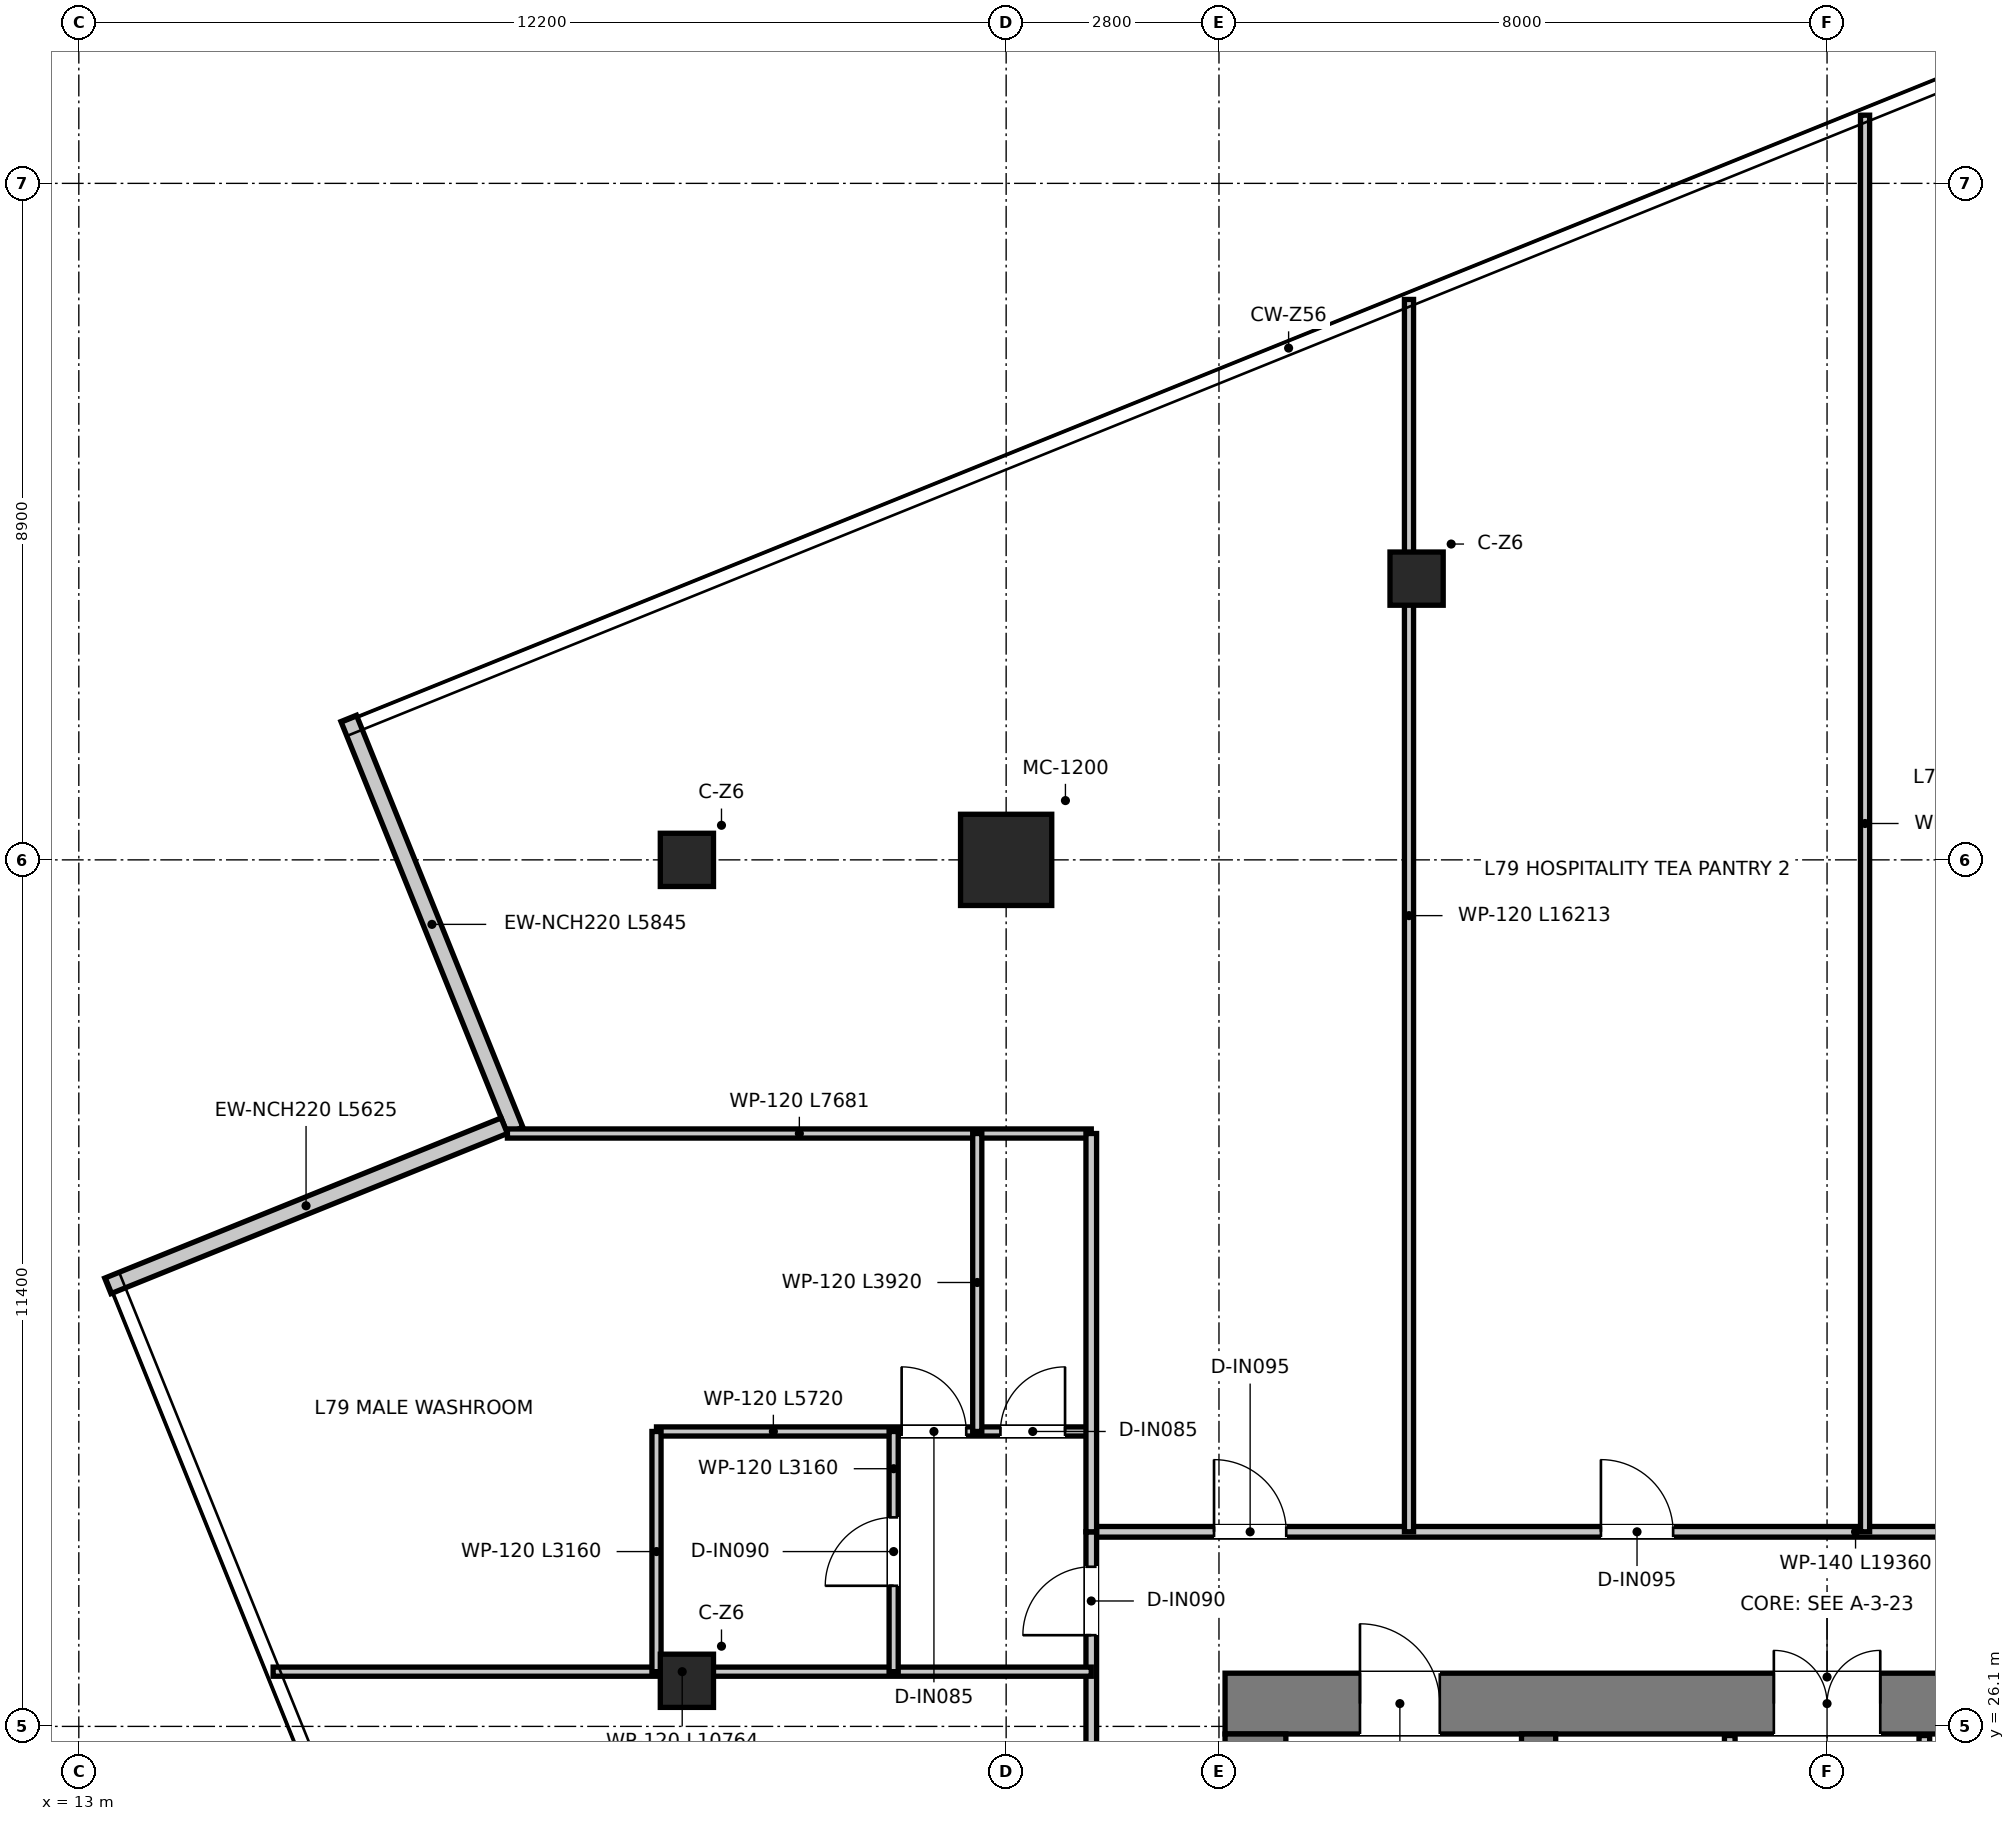
"""IFC4 building model, lengths in metres.
Left out: names, types, materials, properties, quantities, classifications, styles, units other than length and angle.
Written with IfcOpenShell. Run it as: python <this file> out.ifc"""

import sys

from ifc_helpers import new_model, si_unit, direction, frame, frame_2d, origin, origin_2d, place, context, subcontext, project, spatial, rectangle, extrude, source, transform, mapped, element, fill, save


model = new_model("IFC4")
c1 = context("Model", 3, precision=1e-05, world=origin(), true_north=direction((0.0, 1.0)))
c2 = subcontext(c1, "Body", "Model", "MODEL_VIEW")
j1 = project(units=[si_unit("LENGTHUNIT", "METRE"), si_unit("PLANEANGLEUNIT", "RADIAN")], contexts=[c1])
p1 = place(None, origin())
s1 = spatial("IfcSite", under=j1, at=p1, CompositionType="ELEMENT")
p2 = place(p1, origin())
s2 = spatial("IfcBuilding", under=s1, at=p2, CompositionType="ELEMENT")
p3 = place(p2, frame((0.0, 0.0, 323.75)))
s3 = spatial("IfcBuildingStorey", under=s2, at=p3, CompositionType="ELEMENT", Elevation=323.75)
p4 = place(p3, frame((28.08, 26.4, 0.0), z_axis=(0.0, 0.0, 1.0), x_axis=(1.0, 0.0, 0.0)))
e1 = element("IfcWall", 1, at=p4, inside=s3, PredefinedType="SHEAR", context=c2, shape_type="SweptSolid", body=[
    extrude(rectangle(XDim=15.84, YDim=0.8, at=frame_2d((7.92, 0.0))), origin(), (0.0, 0.0, 1.0), 3.95),
])
p5 = place(p4, frame((7.22, 0.0, 0.0)))
e2 = element("IfcOpeningElement", 2, at=p5, cuts=e1, PredefinedType="OPENING", context=c2, shape_type="SweptSolid", body=[
    extrude(rectangle(XDim=1.4, YDim=2.2, at=frame_2d((0.7, 1.1))), frame((0.0, 0.41, 0.0), z_axis=(0.0, -1.0, 0.0), x_axis=(1.0, 0.0, 0.0)), (0.0, 0.0, 1.0), 0.82),
])
p6 = place(p4, frame((1.775, 0.0, 0.0)))
e3 = element("IfcOpeningElement", 3, at=p6, cuts=e1, PredefinedType="OPENING", context=c2, shape_type="SweptSolid", body=[
    extrude(rectangle(XDim=1.05, YDim=2.1, at=frame_2d((0.525, 1.05))), frame((0.0, 0.41, 0.0), z_axis=(0.0, -1.0, 0.0), x_axis=(1.0, 0.0, 0.0)), (0.0, 0.0, 1.0), 0.82),
])
p7 = place(p4, frame((13.015, 0.0, 0.0)))
e4 = element("IfcOpeningElement", 4, at=p7, cuts=e1, PredefinedType="OPENING", context=c2, shape_type="SweptSolid", body=[
    extrude(rectangle(XDim=1.05, YDim=2.1, at=frame_2d((0.525, 1.05))), frame((0.0, 0.41, 0.0), z_axis=(0.0, -1.0, 0.0), x_axis=(1.0, 0.0, 0.0)), (0.0, 0.0, 1.0), 0.82),
])
p8 = place(p3, frame((28.48, 11.3, 0.0), z_axis=(0.0, 0.0, 1.0), x_axis=(0.0, 1.0, 0.0)))
e5 = element("IfcWall", 5, at=p8, inside=s3, PredefinedType="SHEAR", context=c2, shape_type="SweptSolid", body=[
    extrude(rectangle(XDim=14.7, YDim=0.8, at=frame_2d((7.35, 0.0))), origin(), (0.0, 0.0, 1.0), 3.95),
])
p9 = place(p3, frame((32.205, 13.22, 0.0), z_axis=(0.0, 0.0, 1.0), x_axis=(0.0, 1.0, 0.0)))
e6 = element("IfcWall", 6, at=p9, inside=s3, PredefinedType="SHEAR", context=c2, shape_type="SweptSolid", body=[
    extrude(rectangle(XDim=12.78, YDim=0.45, at=frame_2d((6.39, 0.0))), origin(), (0.0, 0.0, 1.0), 3.95),
])
p10 = place(p9, frame((10.58, 0.0, 0.0)))
e7 = element("IfcOpeningElement", 7, at=p10, cuts=e6, PredefinedType="OPENING", context=c2, shape_type="SweptSolid", body=[
    extrude(rectangle(XDim=1.1, YDim=2.15, at=frame_2d((0.55, 1.075))), frame((0.0, 0.235, 0.0), z_axis=(0.0, -1.0, 0.0), x_axis=(1.0, 0.0, 0.0)), (0.0, 0.0, 1.0), 0.47),
])
m1 = source(origin(), c2, "Body", "SweptSolid", [
    extrude(rectangle(XDim=1.2, YDim=1.2, at=origin_2d()), origin(), (0.0, 0.0, 1.0), 3.95),
])
p11 = place(p3, frame((25.2, 37.5, 0.0), z_axis=(0.0, 0.0, 1.0), x_axis=(1.0, 0.0, 0.0)))
e8 = element("IfcColumn", 8, at=p11, inside=s3, PredefinedType="USERDEFINED", context=c2, shape_type="MappedRepresentation", body=[
    mapped(m1, transform((0.0, 0.0, 0.0), x_axis=(1.0, 0.0, 0.0), y_axis=(0.0, 1.0, 0.0), z_axis=(0.0, 0.0, 1.0), scale=1.0)),
])
m2 = source(origin(), c2, "Body", "SweptSolid", [
    extrude(rectangle(XDim=0.7, YDim=0.7, at=origin_2d()), origin(), (0.0, 0.0, 1.0), 3.95),
])
for number, where, z_axis, x_axis in (
    (9, (21.0, 26.7, 0.0), (0.0, 0.0, 1.0), (1.0, 0.0, 0.0)),
    (10, (21.0, 37.5, 0.0), (0.0, 0.0, 1.0), (1.0, 0.0, 0.0)),
    (11, (30.6, 41.2, 0.0), (0.0, 0.0, 1.0), (1.0, 0.0, 0.0)),
):
    element("IfcColumn", number, at=place(p3, frame(where, z_axis=z_axis, x_axis=x_axis)), inside=s3, PredefinedType="COLUMN", context=c2, shape_type="MappedRepresentation", body=[
        mapped(m2, transform((0.0, 0.0, 0.0), x_axis=(1.0, 0.0, 0.0), y_axis=(0.0, 1.0, 0.0), z_axis=(0.0, 0.0, 1.0), scale=1.0)),
    ])
p12 = place(p3, frame((16.551, 39.361, 0.0), z_axis=(0.0, 0.0, 1.0), x_axis=(0.374621884023, -0.927177676614, 0.0)))
e12 = element("IfcWall", 12, at=p12, inside=s3, PredefinedType="ELEMENTEDWALL", context=c2, shape_type="SweptSolid", body=[
    extrude(rectangle(XDim=5.845, YDim=0.22, at=frame_2d((2.922, 0.0))), origin(), (0.0, 0.0, 1.0), 3.67),
])
p13 = place(p3, frame((18.597, 34.002, 0.0), z_axis=(0.0, 0.0, 1.0), x_axis=(-0.927180963658, -0.374613748588, 0.0)))
e13 = element("IfcWall", 13, at=p13, inside=s3, PredefinedType="ELEMENTEDWALL", context=c2, shape_type="SweptSolid", body=[
    extrude(rectangle(XDim=5.625, YDim=0.22, at=frame_2d((2.812, 0.0))), origin(), (0.0, 0.0, 1.0), 3.67),
])
p14 = place(p3, frame((34.72, 20.2, 0.0), z_axis=(0.0, 0.0, 1.0), x_axis=(0.0, 1.0, 0.0)))
e14 = element("IfcWall", 14, at=p14, inside=s3, PredefinedType="PARTITIONING", context=c2, shape_type="SweptSolid", body=[
    extrude(rectangle(XDim=5.78, YDim=0.14, at=frame_2d((2.89, 0.0))), origin(), (0.0, 0.0, 1.0), 2.82),
])
p15 = place(p14, frame((1.05, 0.0, 0.0)))
e15 = element("IfcOpeningElement", 15, at=p15, cuts=e14, PredefinedType="OPENING", context=c2, shape_type="SweptSolid", body=[
    extrude(rectangle(XDim=0.9, YDim=2.1, at=frame_2d((0.45, 1.05))), frame((0.0, 0.08, 0.0), z_axis=(0.0, -1.0, 0.0), x_axis=(1.0, 0.0, 0.0)), (0.0, 0.0, 1.0), 0.16),
])
p16 = place(p3, frame((37.28, 20.2, 0.0), z_axis=(0.0, 0.0, 1.0), x_axis=(0.0, 1.0, 0.0)))
e16 = element("IfcWall", 16, at=p16, inside=s3, PredefinedType="PARTITIONING", context=c2, shape_type="SweptSolid", body=[
    extrude(rectangle(XDim=5.78, YDim=0.14, at=frame_2d((2.89, 0.0))), origin(), (0.0, 0.0, 1.0), 2.82),
])
p17 = place(p16, frame((0.95, 0.0, 0.0)))
e17 = element("IfcOpeningElement", 17, at=p17, cuts=e16, PredefinedType="OPENING", context=c2, shape_type="SweptSolid", body=[
    extrude(rectangle(XDim=1.1, YDim=2.15, at=frame_2d((0.55, 1.075))), frame((0.0, 0.08, 0.0), z_axis=(0.0, -1.0, 0.0), x_axis=(1.0, 0.0, 0.0)), (0.0, 0.0, 1.0), 0.16),
])
p18 = place(p3, frame((26.32, 28.66, 0.0), z_axis=(0.0, 0.0, 1.0), x_axis=(1.0, 0.0, 0.0)))
e18 = element("IfcWall", 18, at=p18, inside=s3, PredefinedType="PARTITIONING", context=c2, shape_type="SweptSolid", body=[
    extrude(rectangle(XDim=19.36, YDim=0.14, at=frame_2d((9.68, 0.0))), origin(), (0.0, 0.0, 1.0), 3.18),
])
p19 = place(p18, frame((1.615, 0.0, 0.0)))
e19 = element("IfcOpeningElement", 19, at=p19, cuts=e18, PredefinedType="OPENING", context=c2, shape_type="SweptSolid", body=[
    extrude(rectangle(XDim=0.95, YDim=2.1, at=frame_2d((0.475, 1.05))), frame((0.0, 0.08, 0.0), z_axis=(0.0, -1.0, 0.0), x_axis=(1.0, 0.0, 0.0)), (0.0, 0.0, 1.0), 0.16),
])
p20 = place(p18, frame((6.705, 0.0, 0.0)))
e20 = element("IfcOpeningElement", 20, at=p20, cuts=e18, PredefinedType="OPENING", context=c2, shape_type="SweptSolid", body=[
    extrude(rectangle(XDim=0.95, YDim=2.1, at=frame_2d((0.475, 1.05))), frame((0.0, 0.08, 0.0), z_axis=(0.0, -1.0, 0.0), x_axis=(1.0, 0.0, 0.0)), (0.0, 0.0, 1.0), 0.16),
])
p21 = place(p18, frame((12.455, 0.0, 0.0)))
e21 = element("IfcOpeningElement", 21, at=p21, cuts=e18, PredefinedType="OPENING", context=c2, shape_type="SweptSolid", body=[
    extrude(rectangle(XDim=0.95, YDim=2.1, at=frame_2d((0.475, 1.05))), frame((0.0, 0.08, 0.0), z_axis=(0.0, -1.0, 0.0), x_axis=(1.0, 0.0, 0.0)), (0.0, 0.0, 1.0), 0.16),
])
p22 = place(p18, frame((17.045, 0.0, 0.0)))
e22 = element("IfcOpeningElement", 22, at=p22, cuts=e18, PredefinedType="OPENING", context=c2, shape_type="SweptSolid", body=[
    extrude(rectangle(XDim=0.95, YDim=2.1, at=frame_2d((0.475, 1.05))), frame((0.0, 0.08, 0.0), z_axis=(0.0, -1.0, 0.0), x_axis=(1.0, 0.0, 0.0)), (0.0, 0.0, 1.0), 0.16),
])
p23 = place(p3, frame((26.32, 13.0, 0.0), z_axis=(0.0, 0.0, 1.0), x_axis=(0.0, 1.0, 0.0)))
e23 = element("IfcWall", 23, at=p23, inside=s3, PredefinedType="PARTITIONING", context=c2, shape_type="SweptSolid", body=[
    extrude(rectangle(XDim=15.66, YDim=0.14, at=frame_2d((7.83, 0.0))), origin(), (0.0, 0.0, 1.0), 3.13),
])
p24 = place(p23, frame((14.3, 0.0, 0.0)))
e24 = element("IfcOpeningElement", 24, at=p24, cuts=e23, PredefinedType="OPENING", context=c2, shape_type="SweptSolid", body=[
    extrude(rectangle(XDim=0.9, YDim=2.1, at=frame_2d((0.45, 1.05))), frame((0.0, 0.08, 0.0), z_axis=(0.0, -1.0, 0.0), x_axis=(1.0, 0.0, 0.0)), (0.0, 0.0, 1.0), 0.16),
])
p25 = place(p23, frame((8.71, 0.0, 0.0)))
e25 = element("IfcOpeningElement", 25, at=p25, cuts=e23, PredefinedType="OPENING", context=c2, shape_type="SweptSolid", body=[
    extrude(rectangle(XDim=0.9, YDim=2.1, at=frame_2d((0.45, 1.05))), frame((0.0, 0.08, 0.0), z_axis=(0.0, -1.0, 0.0), x_axis=(1.0, 0.0, 0.0)), (0.0, 0.0, 1.0), 0.16),
])
p26 = place(p3, frame((15.556, 26.82, 0.0), z_axis=(0.0, 0.0, 1.0), x_axis=(1.0, 0.0, 0.0)))
e26 = element("IfcWall", 26, at=p26, inside=s3, PredefinedType="PARTITIONING", context=c2, shape_type="SweptSolid", body=[
    extrude(rectangle(XDim=10.764, YDim=0.12, at=frame_2d((5.382, 0.0))), origin(), (0.0, 0.0, 1.0), 3.13),
])
p27 = place(p3, frame((18.639, 33.9, 0.0), z_axis=(0.0, 0.0, 1.0), x_axis=(1.0, 0.0, 0.0)))
e27 = element("IfcWall", 27, at=p27, inside=s3, PredefinedType="PARTITIONING", context=c2, shape_type="SweptSolid", body=[
    extrude(rectangle(XDim=7.681, YDim=0.12, at=frame_2d((3.841, 0.0))), origin(), (0.0, 0.0, 1.0), 3.13),
])
p28 = place(p3, frame((20.6, 29.98, 0.0), z_axis=(0.0, 0.0, 1.0), x_axis=(1.0, 0.0, 0.0)))
e28 = element("IfcWall", 28, at=p28, inside=s3, PredefinedType="PARTITIONING", context=c2, shape_type="SweptSolid", body=[
    extrude(rectangle(XDim=5.72, YDim=0.12, at=frame_2d((2.86, 0.0))), origin(), (0.0, 0.0, 1.0), 3.13),
])
p29 = place(p28, frame((3.225, 0.0, 0.0)))
e29 = element("IfcOpeningElement", 29, at=p29, cuts=e28, PredefinedType="OPENING", context=c2, shape_type="SweptSolid", body=[
    extrude(rectangle(XDim=0.85, YDim=2.1, at=frame_2d((0.425, 1.05))), frame((0.0, 0.07, 0.0), z_axis=(0.0, -1.0, 0.0), x_axis=(1.0, 0.0, 0.0)), (0.0, 0.0, 1.0), 0.14),
])
p30 = place(p28, frame((4.525, 0.0, 0.0)))
e30 = element("IfcOpeningElement", 30, at=p30, cuts=e28, PredefinedType="OPENING", context=c2, shape_type="SweptSolid", body=[
    extrude(rectangle(XDim=0.85, YDim=2.1, at=frame_2d((0.425, 1.05))), frame((0.0, 0.07, 0.0), z_axis=(0.0, -1.0, 0.0), x_axis=(1.0, 0.0, 0.0)), (0.0, 0.0, 1.0), 0.14),
])
p31 = place(p3, frame((20.6, 26.82, 0.0), z_axis=(0.0, 0.0, 1.0), x_axis=(0.0, 1.0, 0.0)))
e31 = element("IfcWall", 31, at=p31, inside=s3, PredefinedType="PARTITIONING", context=c2, shape_type="SweptSolid", body=[
    extrude(rectangle(XDim=3.16, YDim=0.12, at=frame_2d((1.58, 0.0))), origin(), (0.0, 0.0, 1.0), 3.67),
])
p32 = place(p3, frame((23.72, 26.82, 0.0), z_axis=(0.0, 0.0, 1.0), x_axis=(0.0, 1.0, 0.0)))
e32 = element("IfcWall", 32, at=p32, inside=s3, PredefinedType="PARTITIONING", context=c2, shape_type="SweptSolid", body=[
    extrude(rectangle(XDim=3.16, YDim=0.12, at=frame_2d((1.58, 0.0))), origin(), (0.0, 0.0, 1.0), 3.18),
])
p33 = place(p32, frame((1.13, 0.0, 0.0)))
e33 = element("IfcOpeningElement", 33, at=p33, cuts=e32, PredefinedType="OPENING", context=c2, shape_type="SweptSolid", body=[
    extrude(rectangle(XDim=0.9, YDim=2.1, at=frame_2d((0.45, 1.05))), frame((0.0, 0.07, 0.0), z_axis=(0.0, -1.0, 0.0), x_axis=(1.0, 0.0, 0.0)), (0.0, 0.0, 1.0), 0.14),
])
p34 = place(p3, frame((24.82, 29.98, 0.0), z_axis=(0.0, 0.0, 1.0), x_axis=(0.0, 1.0, 0.0)))
e34 = element("IfcWall", 34, at=p34, inside=s3, PredefinedType="PARTITIONING", context=c2, shape_type="SweptSolid", body=[
    extrude(rectangle(XDim=3.92, YDim=0.12, at=frame_2d((1.96, 0.0))), origin(), (0.0, 0.0, 1.0), 3.37),
])
p35 = place(p3, frame((26.32, 28.66, 0.0), z_axis=(0.0, 0.0, 1.0), x_axis=(0.0, 1.0, 0.0)))
e35 = element("IfcWall", 35, at=p35, inside=s3, PredefinedType="PARTITIONING", context=c2, shape_type="SweptSolid", body=[
    extrude(rectangle(XDim=5.24, YDim=0.14, at=frame_2d((2.62, 0.0))), origin(), (0.0, 0.0, 1.0), 3.43),
])
p36 = place(p3, frame((30.5, 28.66, 0.0), z_axis=(0.0, 0.0, 1.0), x_axis=(0.0, 1.0, 0.0)))
e36 = element("IfcWall", 36, at=p36, inside=s3, PredefinedType="PARTITIONING", context=c2, shape_type="SweptSolid", body=[
    extrude(rectangle(XDim=16.213, YDim=0.12, at=frame_2d((8.106, 0.0))), origin(), (0.0, 0.0, 1.0), 3.13),
])
p37 = place(p3, frame((36.5, 28.66, 0.0), z_axis=(0.0, 0.0, 1.0), x_axis=(0.0, 1.0, 0.0)))
e37 = element("IfcWall", 37, at=p37, inside=s3, PredefinedType="PARTITIONING", context=c2, shape_type="SweptSolid", body=[
    extrude(rectangle(XDim=18.637, YDim=0.12, at=frame_2d((9.319, 0.0))), origin(), (0.0, 0.0, 1.0), 3.13),
])
p38 = place(p5, origin())
e38 = element("IfcDoor", 38, at=p38, inside=s3, OperationType="DOUBLE_DOOR_SINGLE_SWING", PredefinedType="DOOR", context=c2, shape_type="SweptSolid", body=[
    extrude(rectangle(XDim=1.4, YDim=2.2, at=frame_2d((0.7, 1.1))), frame((0.0, 0.025, 0.0), z_axis=(0.0, -1.0, 0.0), x_axis=(1.0, 0.0, 0.0)), (0.0, 0.0, 1.0), 0.05),
])
fill(e2, e38)
p39 = place(p6, origin())
e39 = element("IfcDoor", 39, at=p39, inside=s3, OperationType="SINGLE_SWING_LEFT", PredefinedType="DOOR", context=c2, shape_type="SweptSolid", body=[
    extrude(rectangle(XDim=1.05, YDim=2.1, at=frame_2d((0.525, 1.05))), frame((0.0, 0.025, 0.0), z_axis=(0.0, -1.0, 0.0), x_axis=(1.0, 0.0, 0.0)), (0.0, 0.0, 1.0), 0.05),
])
fill(e3, e39)
p40 = place(p24, origin())
e40 = element("IfcDoor", 40, at=p40, inside=s3, OperationType="SINGLE_SWING_LEFT", PredefinedType="DOOR", context=c2, shape_type="SweptSolid", body=[
    extrude(rectangle(XDim=0.9, YDim=2.1, at=frame_2d((0.45, 1.05))), frame((0.0, 0.025, 0.0), z_axis=(0.0, -1.0, 0.0), x_axis=(1.0, 0.0, 0.0)), (0.0, 0.0, 1.0), 0.05),
])
fill(e24, e40)
p41 = place(p29, origin())
e41 = element("IfcDoor", 41, at=p41, inside=s3, OperationType="SINGLE_SWING_LEFT", PredefinedType="DOOR", context=c2, shape_type="SweptSolid", body=[
    extrude(rectangle(XDim=0.85, YDim=2.1, at=frame_2d((0.425, 1.05))), frame((0.0, 0.025, 0.0), z_axis=(0.0, -1.0, 0.0), x_axis=(1.0, 0.0, 0.0)), (0.0, 0.0, 1.0), 0.05),
])
fill(e29, e41)
p42 = place(p30, origin())
e42 = element("IfcDoor", 42, at=p42, inside=s3, OperationType="SINGLE_SWING_RIGHT", PredefinedType="DOOR", context=c2, shape_type="SweptSolid", body=[
    extrude(rectangle(XDim=0.85, YDim=2.1, at=frame_2d((0.425, 1.05))), frame((0.0, 0.025, 0.0), z_axis=(0.0, -1.0, 0.0), x_axis=(1.0, 0.0, 0.0)), (0.0, 0.0, 1.0), 0.05),
])
fill(e30, e42)
p43 = place(p33, origin())
e43 = element("IfcDoor", 43, at=p43, inside=s3, OperationType="SINGLE_SWING_LEFT", PredefinedType="DOOR", context=c2, shape_type="SweptSolid", body=[
    extrude(rectangle(XDim=0.9, YDim=2.1, at=frame_2d((0.45, 1.05))), frame((0.0, 0.025, 0.0), z_axis=(0.0, -1.0, 0.0), x_axis=(1.0, 0.0, 0.0)), (0.0, 0.0, 1.0), 0.05),
])
fill(e33, e43)
p44 = place(p19, origin())
e44 = element("IfcDoor", 44, at=p44, inside=s3, OperationType="SINGLE_SWING_LEFT", PredefinedType="DOOR", context=c2, shape_type="SweptSolid", body=[
    extrude(rectangle(XDim=0.95, YDim=2.1, at=frame_2d((0.475, 1.05))), frame((0.0, 0.025, 0.0), z_axis=(0.0, -1.0, 0.0), x_axis=(1.0, 0.0, 0.0)), (0.0, 0.0, 1.0), 0.05),
])
fill(e19, e44)
p45 = place(p20, origin())
e45 = element("IfcDoor", 45, at=p45, inside=s3, OperationType="SINGLE_SWING_LEFT", PredefinedType="DOOR", context=c2, shape_type="SweptSolid", body=[
    extrude(rectangle(XDim=0.95, YDim=2.1, at=frame_2d((0.475, 1.05))), frame((0.0, 0.025, 0.0), z_axis=(0.0, -1.0, 0.0), x_axis=(1.0, 0.0, 0.0)), (0.0, 0.0, 1.0), 0.05),
])
fill(e20, e45)
save(model, sys.argv[1])
